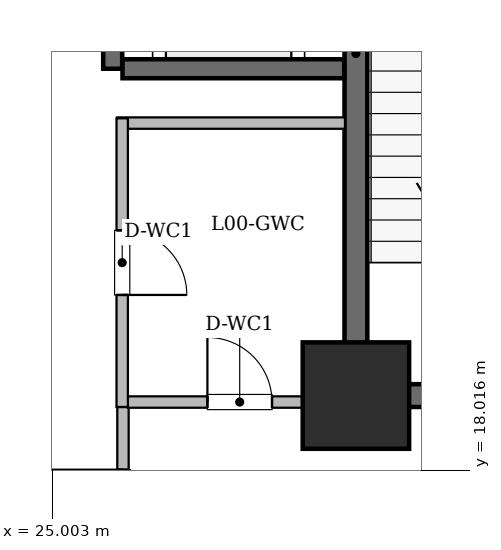
"""IFC4 building model, lengths in metres.
Left out: names, types, materials, properties, quantities, classifications, styles, units other than length and angle.
Written with IfcOpenShell. Run it as: python <this file> out.ifc"""

import sys

from ifc_helpers import new_model, si_unit, direction, frame, frame_2d, origin, origin_2d, place, context, subcontext, project, spatial, rectangle, hollow_rectangle, extrude, element, fill, save


model = new_model("IFC4")
c1 = context("Model", 3, precision=1e-05, world=origin(), true_north=direction((0.0, 1.0)))
c2 = subcontext(c1, "Body", "Model", "MODEL_VIEW")
j1 = project(units=[si_unit("LENGTHUNIT", "METRE"), si_unit("PLANEANGLEUNIT", "RADIAN")], contexts=[c1])
p1 = place(None, origin())
s1 = spatial("IfcSite", under=j1, at=p1, CompositionType="ELEMENT")
p2 = place(p1, origin())
s2 = spatial("IfcBuilding", under=s1, at=p2, CompositionType="ELEMENT")
p3 = place(p2, origin())
s3 = spatial("IfcBuildingStorey", under=s2, at=p3, CompositionType="ELEMENT", Elevation=0.0)
p4 = place(p3, frame((29.0, 19.0, 0.0), z_axis=(0.0, 0.0, 1.0), x_axis=(1.0, 0.0, 0.0)))
e1 = element("IfcColumn", 1, at=p4, inside=s3, PredefinedType="COLUMN", context=c2, shape_type="SweptSolid", body=[
    extrude(hollow_rectangle(XDim=1.4, YDim=1.4, WallThickness=0.07, at=origin_2d()), origin(), (0.0, 0.0, 1.0), 7.2),
])
p5 = place(p3, frame((29.0, 19.0, 0.0), z_axis=(0.0, 0.0, 1.0), x_axis=(0.0, 1.0, 0.0)))
e2 = element("IfcWall", 2, at=p5, inside=s3, PredefinedType="SHEAR", context=c2, shape_type="SweptSolid", body=[
    extrude(rectangle(XDim=9.0, YDim=0.3, at=frame_2d((4.5, 0.0))), origin(), (0.0, 0.0, 1.0), 6.78),
])
p6 = place(p3, frame((39.4, 19.0, 0.0), z_axis=(0.0, 0.0, 1.0), x_axis=(-1.0, 0.0, 0.0)))
e3 = element("IfcWall", 3, at=p6, inside=s3, PredefinedType="SHEAR", context=c2, shape_type="SweptSolid", body=[
    extrude(rectangle(XDim=10.4, YDim=0.3, at=frame_2d((5.2, 0.0))), origin(), (0.0, 0.0, 1.0), 6.78),
])
p7 = place(p6, frame((4.3, 0.0, 0.0)))
e4 = element("IfcOpeningElement", 4, at=p7, cuts=e3, PredefinedType="OPENING", context=c2, shape_type="SweptSolid", body=[
    extrude(rectangle(XDim=1.2, YDim=2.15, at=frame_2d((0.6, 1.075))), frame((0.0, 0.16, 0.0), z_axis=(0.0, -1.0, 0.0), x_axis=(1.0, 0.0, 0.0)), (0.0, 0.0, 1.0), 0.32),
])
p8 = place(p3, frame((25.8, 23.3, 0.0), z_axis=(0.0, 0.0, 1.0), x_axis=(0.0, 1.0, 0.0)))
e5 = element("IfcWall", 5, at=p8, inside=s3, PredefinedType="SHEAR", context=c2, shape_type="SweptSolid", body=[
    extrude(rectangle(XDim=4.55, YDim=0.25, at=frame_2d((2.275, 0.0))), origin(), (0.0, 0.0, 1.0), 6.78),
])
p9 = place(p8, frame((0.6, 0.0, 0.0)))
e6 = element("IfcOpeningElement", 6, at=p9, cuts=e5, PredefinedType="OPENING", context=c2, shape_type="SweptSolid", body=[
    extrude(rectangle(XDim=1.1, YDim=2.15, at=frame_2d((0.55, 1.075))), frame((0.0, 0.135, 0.0), z_axis=(0.0, -1.0, 0.0), x_axis=(1.0, 0.0, 0.0)), (0.0, 0.0, 1.0), 0.27),
])
p10 = place(p8, frame((2.85, 0.0, 0.0)))
e7 = element("IfcOpeningElement", 7, at=p10, cuts=e5, PredefinedType="OPENING", context=c2, shape_type="SweptSolid", body=[
    extrude(rectangle(XDim=1.1, YDim=2.15, at=frame_2d((0.55, 1.075))), frame((0.0, 0.135, 0.0), z_axis=(0.0, -1.0, 0.0), x_axis=(1.0, 0.0, 0.0)), (0.0, 0.0, 1.0), 0.27),
])
p11 = place(p3, frame((25.929, 23.3, 0.0), z_axis=(0.0, 0.0, 1.0), x_axis=(1.0, 0.0, 0.0)))
e8 = element("IfcWall", 8, at=p11, inside=s3, PredefinedType="SHEAR", context=c2, shape_type="SweptSolid", body=[
    extrude(rectangle(XDim=2.917, YDim=0.25, at=frame_2d((1.458, 0.0))), origin(), (0.0, 0.0, 1.0), 6.78),
])
p12 = place(p3, frame((25.935, 16.0, 0.0), z_axis=(0.0, 0.0, 1.0), x_axis=(0.0, 1.0, 0.0)))
e9 = element("IfcWall", 9, at=p12, inside=s3, PredefinedType="STANDARD", context=c2, shape_type="SweptSolid", body=[
    extrude(rectangle(XDim=2.85, YDim=0.15, at=frame_2d((1.425, 0.0))), origin(), (0.0, 0.0, 1.0), 6.78),
])
p13 = place(p12, frame((0.825, 0.0, 0.0)))
e10 = element("IfcOpeningElement", 10, at=p13, cuts=e9, PredefinedType="OPENING", context=c2, shape_type="SweptSolid", body=[
    extrude(rectangle(XDim=1.2, YDim=2.15, at=frame_2d((0.6, 1.075))), frame((0.0, 0.085, 0.0), z_axis=(0.0, -1.0, 0.0), x_axis=(1.0, 0.0, 0.0)), (0.0, 0.0, 1.0), 0.17),
])
p14 = place(p3, frame((26.0, 18.915, 0.0), z_axis=(0.0, 0.0, 1.0), x_axis=(1.0, 0.0, 0.0)))
e11 = element("IfcWall", 11, at=p14, inside=s3, PredefinedType="STANDARD", context=c2, shape_type="SweptSolid", body=[
    extrude(rectangle(XDim=2.943, YDim=0.15, at=frame_2d((1.472, 0.0))), origin(), (0.0, 0.0, 1.0), 6.237),
])
p15 = place(p14, frame((1.046, 0.0, 0.0)))
e12 = element("IfcOpeningElement", 12, at=p15, cuts=e11, PredefinedType="OPENING", context=c2, shape_type="SweptSolid", body=[
    extrude(rectangle(XDim=0.85, YDim=2.1, at=frame_2d((0.425, 1.05))), frame((0.0, 0.085, 0.0), z_axis=(0.0, -1.0, 0.0), x_axis=(1.0, 0.0, 0.0)), (0.0, 0.0, 1.0), 0.17),
])
p16 = place(p3, frame((28.856, 22.585, 0.0), z_axis=(0.0, 0.0, 1.0), x_axis=(-1.0, 0.0, 0.0)))
e13 = element("IfcWall", 13, at=p16, inside=s3, PredefinedType="STANDARD", context=c2, shape_type="SweptSolid", body=[
    extrude(rectangle(XDim=2.996, YDim=0.15, at=frame_2d((1.498, 0.0))), origin(), (0.0, 0.0, 1.0), 6.237),
])
p17 = place(p3, frame((25.925, 22.648, 0.0), z_axis=(0.0, 0.0, 1.0), x_axis=(0.0, -1.0, 0.0)))
e14 = element("IfcWall", 14, at=p17, inside=s3, PredefinedType="STANDARD", context=c2, shape_type="SweptSolid", body=[
    extrude(rectangle(XDim=3.798, YDim=0.15, at=frame_2d((1.899, 0.0))), origin(), (0.0, 0.0, 1.0), 6.78),
])
p18 = place(p17, frame((1.474, 0.0, 0.0)))
e15 = element("IfcOpeningElement", 15, at=p18, cuts=e14, PredefinedType="OPENING", context=c2, shape_type="SweptSolid", body=[
    extrude(rectangle(XDim=0.85, YDim=2.1, at=frame_2d((0.425, 1.05))), frame((0.0, 0.085, 0.0), z_axis=(0.0, -1.0, 0.0), x_axis=(1.0, 0.0, 0.0)), (0.0, 0.0, 1.0), 0.17),
])
p19 = place(p13, origin())
e16 = element("IfcDoor", 16, at=p19, inside=s3, OperationType="SINGLE_SWING_RIGHT", PredefinedType="DOOR", context=c2, shape_type="SweptSolid", body=[
    extrude(rectangle(XDim=1.2, YDim=2.15, at=frame_2d((0.6, 1.075))), frame((0.0, 0.025, 0.0), z_axis=(0.0, -1.0, 0.0), x_axis=(1.0, 0.0, 0.0)), (0.0, 0.0, 1.0), 0.05),
])
fill(e10, e16)
p20 = place(p15, origin())
e17 = element("IfcDoor", 17, at=p20, inside=s3, OperationType="SINGLE_SWING_LEFT", PredefinedType="DOOR", context=c2, shape_type="SweptSolid", body=[
    extrude(rectangle(XDim=0.85, YDim=2.1, at=frame_2d((0.425, 1.05))), frame((0.0, 0.025, 0.0), z_axis=(0.0, -1.0, 0.0), x_axis=(1.0, 0.0, 0.0)), (0.0, 0.0, 1.0), 0.05),
])
fill(e12, e17)
p21 = place(p18, origin())
e18 = element("IfcDoor", 18, at=p21, inside=s3, OperationType="SINGLE_SWING_RIGHT", PredefinedType="DOOR", context=c2, shape_type="SweptSolid", body=[
    extrude(rectangle(XDim=0.85, YDim=2.1, at=frame_2d((0.425, 1.05))), frame((0.0, 0.025, 0.0), z_axis=(0.0, -1.0, 0.0), x_axis=(1.0, 0.0, 0.0)), (0.0, 0.0, 1.0), 0.05),
])
fill(e15, e18)
save(model, sys.argv[1])
